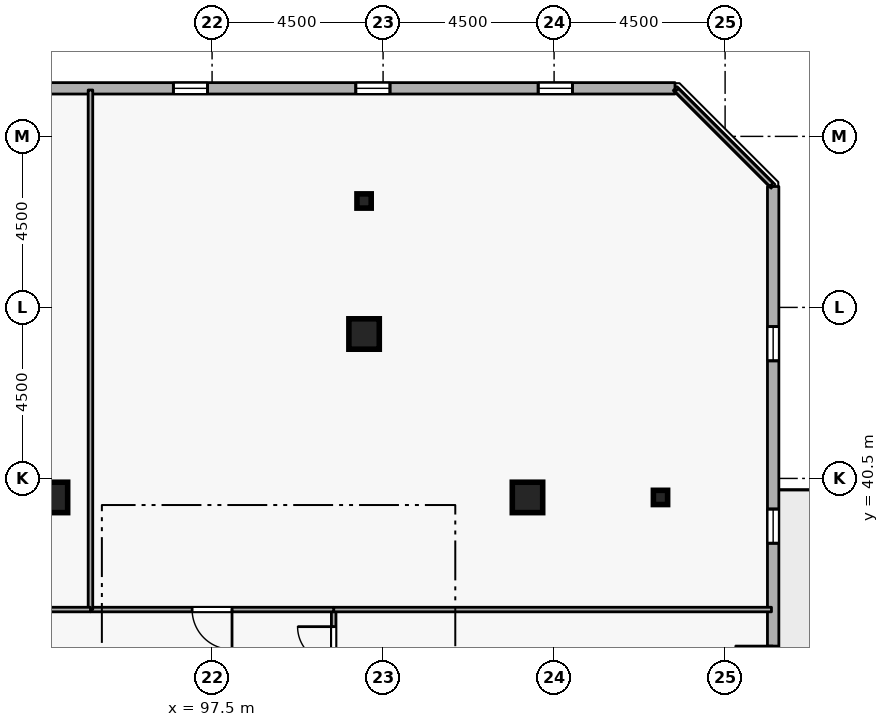
"""IFC4 building model, lengths in metres.
Left out: names, types, materials, properties, quantities, classifications, styles, units other than length and angle.
Written with IfcOpenShell. Run it as: python <this file> out.ifc"""

import sys

from ifc_helpers import new_model, si_unit, direction, frame, frame_2d, origin, origin_2d, place, context, subcontext, project, spatial, rectangle, i_section, extrude, element, fill, save


model = new_model("IFC4")
c1 = context("Model", 3, precision=1e-05, world=origin(), true_north=direction((0.0, 1.0)))
c2 = subcontext(c1, "Body", "Model", "MODEL_VIEW")
j1 = project(units=[si_unit("LENGTHUNIT", "METRE"), si_unit("PLANEANGLEUNIT", "RADIAN")], contexts=[c1])
p1 = place(None, origin())
s1 = spatial("IfcSite", under=j1, at=p1, CompositionType="ELEMENT")
p2 = place(p1, origin())
s2 = spatial("IfcBuilding", under=s1, at=p2, CompositionType="ELEMENT")
p3 = place(p2, frame((0.0, 0.0, 272.7)))
s3 = spatial("IfcBuildingStorey", under=s2, at=p3, CompositionType="ELEMENT", Elevation=272.7)
for number, where, z_axis, x_axis in (
    (1, (105.8, 40.0, 0.0), (0.0, 0.0, 1.0), (1.0, 0.0, 0.0)),
    (2, (101.5, 44.3, 0.0), (0.0, 0.0, 1.0), (1.0, 0.0, 0.0)),
    (3, (93.3, 40.0, 0.0), (0.0, 0.0, 1.0), (1.0, 0.0, 0.0)),
):
    element("IfcColumn", number, at=place(p3, frame(where, z_axis=z_axis, x_axis=x_axis)), inside=s3, PredefinedType="COLUMN", context=c2, shape_type="SweptSolid", body=[
        extrude(rectangle(XDim=0.8, YDim=0.8, at=origin_2d()), origin(), (0.0, 0.0, 1.0), 3.6),
    ])
for number, where, z_axis, x_axis in (
    (4, (109.3, 40.0, 0.0), (0.0, 0.0, 1.0), (1.0, 0.0, 0.0)),
    (5, (101.5, 47.8, 0.0), (0.0, 0.0, 1.0), (1.0, 0.0, 0.0)),
):
    element("IfcColumn", number, at=place(p3, frame(where, z_axis=z_axis, x_axis=x_axis)), inside=s3, PredefinedType="COLUMN", context=c2, shape_type="SweptSolid", body=[
        extrude(i_section(OverallWidth=0.375, OverallDepth=0.375, WebThickness=0.017, FlangeThickness=0.027, FilletRadius=0.015, at=origin_2d()), origin(), (0.0, 0.0, 1.0), 3.6),
    ])
p4 = place(p3, frame((112.264, 12.094, 0.0), z_axis=(0.0, 0.0, 1.0), x_axis=(2.7061402e-05, 0.999999999634, 0.0)))
e6 = element("IfcWall", 6, at=p4, inside=s3, PredefinedType="STANDARD", context=c2, shape_type="SweptSolid", body=[
    extrude(rectangle(XDim=36.087, YDim=0.3, at=frame_2d((18.043, 0.0))), origin(), (0.0, 0.0, 1.0), 2.7),
])
p5 = place(p4, frame((22.993, 0.0, 0.0)))
e7 = element("IfcOpeningElement", 7, at=p5, cuts=e6, PredefinedType="OPENING", context=c2, shape_type="SweptSolid", body=[
    extrude(rectangle(XDim=1.0, YDim=2.08, at=frame_2d((0.5, 1.04))), frame((0.0, 0.16, 0.0), z_axis=(0.0, -1.0, 0.0), x_axis=(1.0, 0.0, 0.0)), (0.0, 0.0, 1.0), 0.32),
])
p6 = place(p4, frame((2.7, 0.0, 0.72)))
e8 = element("IfcOpeningElement", 8, at=p6, cuts=e6, PredefinedType="OPENING", context=c2, shape_type="SweptSolid", body=[
    extrude(rectangle(XDim=0.9, YDim=1.75, at=frame_2d((0.45, 0.875))), frame((0.0, 0.16, 0.0), z_axis=(0.0, -1.0, 0.0), x_axis=(1.0, 0.0, 0.0)), (0.0, 0.0, 1.0), 0.32),
])
p7 = place(p4, frame((7.5, 0.0, 0.72)))
e9 = element("IfcOpeningElement", 9, at=p7, cuts=e6, PredefinedType="OPENING", context=c2, shape_type="SweptSolid", body=[
    extrude(rectangle(XDim=0.9, YDim=1.75, at=frame_2d((0.45, 0.875))), frame((0.0, 0.16, 0.0), z_axis=(0.0, -1.0, 0.0), x_axis=(1.0, 0.0, 0.0)), (0.0, 0.0, 1.0), 0.32),
])
p8 = place(p4, frame((12.3, 0.0, 0.72)))
e10 = element("IfcOpeningElement", 10, at=p8, cuts=e6, PredefinedType="OPENING", context=c2, shape_type="SweptSolid", body=[
    extrude(rectangle(XDim=0.9, YDim=1.75, at=frame_2d((0.45, 0.875))), frame((0.0, 0.16, 0.0), z_axis=(0.0, -1.0, 0.0), x_axis=(1.0, 0.0, 0.0)), (0.0, 0.0, 1.0), 0.32),
])
p9 = place(p4, frame((17.1, 0.0, 0.72)))
e11 = element("IfcOpeningElement", 11, at=p9, cuts=e6, PredefinedType="OPENING", context=c2, shape_type="SweptSolid", body=[
    extrude(rectangle(XDim=0.9, YDim=1.75, at=frame_2d((0.45, 0.875))), frame((0.0, 0.16, 0.0), z_axis=(0.0, -1.0, 0.0), x_axis=(1.0, 0.0, 0.0)), (0.0, 0.0, 1.0), 0.32),
])
p10 = place(p4, frame((26.7, 0.0, 0.72)))
e12 = element("IfcOpeningElement", 12, at=p10, cuts=e6, PredefinedType="OPENING", context=c2, shape_type="SweptSolid", body=[
    extrude(rectangle(XDim=0.9, YDim=1.75, at=frame_2d((0.45, 0.875))), frame((0.0, 0.16, 0.0), z_axis=(0.0, -1.0, 0.0), x_axis=(1.0, 0.0, 0.0)), (0.0, 0.0, 1.0), 0.32),
])
p11 = place(p4, frame((31.5, 0.0, 0.72)))
e13 = element("IfcOpeningElement", 13, at=p11, cuts=e6, PredefinedType="OPENING", context=c2, shape_type="SweptSolid", body=[
    extrude(rectangle(XDim=0.9, YDim=1.75, at=frame_2d((0.45, 0.875))), frame((0.0, 0.16, 0.0), z_axis=(0.0, -1.0, 0.0), x_axis=(1.0, 0.0, 0.0)), (0.0, 0.0, 1.0), 0.32),
])
p12 = place(p3, frame((109.681, 50.765, 0.0), z_axis=(0.0, 0.0, 1.0), x_axis=(-0.999999999634, -2.7061402e-05, 0.0)))
e14 = element("IfcWall", 14, at=p12, inside=s3, PredefinedType="STANDARD", context=c2, shape_type="SweptSolid", body=[
    extrude(rectangle(XDim=36.087, YDim=0.3, at=frame_2d((18.043, 0.0))), origin(), (0.0, 0.0, 1.0), 2.7),
])
p13 = place(p12, frame((2.7, 0.0, 0.72)))
e15 = element("IfcOpeningElement", 15, at=p13, cuts=e14, PredefinedType="OPENING", context=c2, shape_type="SweptSolid", body=[
    extrude(rectangle(XDim=0.9, YDim=1.75, at=frame_2d((0.45, 0.875))), frame((0.0, 0.16, 0.0), z_axis=(0.0, -1.0, 0.0), x_axis=(1.0, 0.0, 0.0)), (0.0, 0.0, 1.0), 0.32),
])
p14 = place(p12, frame((7.5, 0.0, 0.72)))
e16 = element("IfcOpeningElement", 16, at=p14, cuts=e14, PredefinedType="OPENING", context=c2, shape_type="SweptSolid", body=[
    extrude(rectangle(XDim=0.9, YDim=1.75, at=frame_2d((0.45, 0.875))), frame((0.0, 0.16, 0.0), z_axis=(0.0, -1.0, 0.0), x_axis=(1.0, 0.0, 0.0)), (0.0, 0.0, 1.0), 0.32),
])
p15 = place(p12, frame((12.3, 0.0, 0.72)))
e17 = element("IfcOpeningElement", 17, at=p15, cuts=e14, PredefinedType="OPENING", context=c2, shape_type="SweptSolid", body=[
    extrude(rectangle(XDim=0.9, YDim=1.75, at=frame_2d((0.45, 0.875))), frame((0.0, 0.16, 0.0), z_axis=(0.0, -1.0, 0.0), x_axis=(1.0, 0.0, 0.0)), (0.0, 0.0, 1.0), 0.32),
])
p16 = place(p12, frame((17.1, 0.0, 0.72)))
e18 = element("IfcOpeningElement", 18, at=p16, cuts=e14, PredefinedType="OPENING", context=c2, shape_type="SweptSolid", body=[
    extrude(rectangle(XDim=0.9, YDim=1.75, at=frame_2d((0.45, 0.875))), frame((0.0, 0.16, 0.0), z_axis=(0.0, -1.0, 0.0), x_axis=(1.0, 0.0, 0.0)), (0.0, 0.0, 1.0), 0.32),
])
p17 = place(p12, frame((21.9, 0.0, 0.72)))
e19 = element("IfcOpeningElement", 19, at=p17, cuts=e14, PredefinedType="OPENING", context=c2, shape_type="SweptSolid", body=[
    extrude(rectangle(XDim=0.9, YDim=1.75, at=frame_2d((0.45, 0.875))), frame((0.0, 0.16, 0.0), z_axis=(0.0, -1.0, 0.0), x_axis=(1.0, 0.0, 0.0)), (0.0, 0.0, 1.0), 0.32),
])
p18 = place(p12, frame((26.7, 0.0, 0.72)))
e20 = element("IfcOpeningElement", 20, at=p18, cuts=e14, PredefinedType="OPENING", context=c2, shape_type="SweptSolid", body=[
    extrude(rectangle(XDim=0.9, YDim=1.75, at=frame_2d((0.45, 0.875))), frame((0.0, 0.16, 0.0), z_axis=(0.0, -1.0, 0.0), x_axis=(1.0, 0.0, 0.0)), (0.0, 0.0, 1.0), 0.32),
])
p19 = place(p12, frame((31.5, 0.0, 0.72)))
e21 = element("IfcOpeningElement", 21, at=p19, cuts=e14, PredefinedType="OPENING", context=c2, shape_type="SweptSolid", body=[
    extrude(rectangle(XDim=0.9, YDim=1.75, at=frame_2d((0.45, 0.875))), frame((0.0, 0.16, 0.0), z_axis=(0.0, -1.0, 0.0), x_axis=(1.0, 0.0, 0.0)), (0.0, 0.0, 1.0), 0.32),
])
p20 = place(p3, frame((100.7, 35.2, 0.0), z_axis=(0.0, 0.0, 1.0), x_axis=(0.0, 1.0, 0.0)))
e22 = element("IfcWall", 22, at=p20, inside=s3, PredefinedType="PARTITIONING", context=c2, shape_type="SweptSolid", body=[
    extrude(rectangle(XDim=1.85, YDim=0.12, at=frame_2d((0.925, 0.0))), origin(), (0.0, 0.0, 1.0), 3.34),
])
p21 = place(p20, frame((0.45, 0.0, 0.0)))
e23 = element("IfcOpeningElement", 23, at=p21, cuts=e22, PredefinedType="OPENING", context=c2, shape_type="SweptSolid", body=[
    extrude(rectangle(XDim=0.95, YDim=2.1, at=frame_2d((0.475, 1.05))), frame((0.0, 0.07, 0.0), z_axis=(0.0, -1.0, 0.0), x_axis=(1.0, 0.0, 0.0)), (0.0, 0.0, 1.0), 0.14),
])
p22 = place(p3, frame((100.7, 37.05, 0.0), z_axis=(0.0, 0.0, 1.0), x_axis=(1.0, 0.0, 0.0)))
e24 = element("IfcWall", 24, at=p22, inside=s3, PredefinedType="PARTITIONING", context=c2, shape_type="SweptSolid", body=[
    extrude(rectangle(XDim=11.52, YDim=0.12, at=frame_2d((5.76, 0.0))), origin(), (0.0, 0.0, 1.0), 3.34),
])
p23 = place(p3, frame((100.7, 37.05, 0.0), z_axis=(0.0, 0.0, 1.0), x_axis=(-1.0, 0.0, 0.0)))
e25 = element("IfcWall", 25, at=p23, inside=s3, PredefinedType="PARTITIONING", context=c2, shape_type="SweptSolid", body=[
    extrude(rectangle(XDim=6.4, YDim=0.12, at=frame_2d((3.2, 0.0))), origin(), (0.0, 0.0, 1.0), 3.34),
])
p24 = place(p23, frame((2.675, 0.0, 0.0)))
e26 = element("IfcOpeningElement", 26, at=p24, cuts=e25, PredefinedType="OPENING", context=c2, shape_type="SweptSolid", body=[
    extrude(rectangle(XDim=1.05, YDim=2.1, at=frame_2d((0.525, 1.05))), frame((0.0, 0.07, 0.0), z_axis=(0.0, -1.0, 0.0), x_axis=(1.0, 0.0, 0.0)), (0.0, 0.0, 1.0), 0.14),
])
p25 = place(p3, frame((94.3, 37.05, 0.0), z_axis=(0.0, 0.0, 1.0), x_axis=(0.0, 1.0, 0.0)))
e27 = element("IfcWall", 27, at=p25, inside=s3, PredefinedType="PARTITIONING", context=c2, shape_type="SweptSolid", body=[
    extrude(rectangle(XDim=13.67, YDim=0.12, at=frame_2d((6.835, 0.0))), origin(), (0.0, 0.0, 1.0), 3.34),
])
p26 = place(p3, frame((109.725, 50.72, 0.0), z_axis=(0.0, 0.0, 1.0), x_axis=(0.707106781187, -0.707106781187, 0.0)))
e28 = element("IfcWall", 28, at=p26, inside=s3, PredefinedType="PARTITIONING", context=c2, shape_type="SweptSolid", body=[
    extrude(rectangle(XDim=3.528, YDim=0.12, at=frame_2d((1.764, 0.0))), origin(), (0.0, 0.0, 1.0), 3.34),
])
p27 = place(p3, frame((94.3, 37.05, 0.0), z_axis=(0.0, 0.0, 1.0), x_axis=(-1.0, 0.0, 0.0)))
e29 = element("IfcWall", 29, at=p27, inside=s3, PredefinedType="PARTITIONING", context=c2, shape_type="SweptSolid", body=[
    extrude(rectangle(XDim=5.4, YDim=0.12, at=frame_2d((2.7, 0.0))), origin(), (0.0, 0.0, 1.0), 3.34),
])
p28 = place(p27, frame((2.225, 0.0, 0.0)))
e30 = element("IfcOpeningElement", 30, at=p28, cuts=e29, PredefinedType="OPENING", context=c2, shape_type="SweptSolid", body=[
    extrude(rectangle(XDim=0.95, YDim=2.1, at=frame_2d((0.475, 1.05))), frame((0.0, 0.07, 0.0), z_axis=(0.0, -1.0, 0.0), x_axis=(1.0, 0.0, 0.0)), (0.0, 0.0, 1.0), 0.14),
])
p29 = place(p5, origin())
e31 = element("IfcDoor", 31, at=p29, inside=s3, OperationType="SINGLE_SWING_RIGHT", PredefinedType="DOOR", context=c2, shape_type="SweptSolid", body=[
    extrude(rectangle(XDim=1.0, YDim=2.08, at=frame_2d((0.5, 1.04))), frame((0.0, 0.025, 0.0), z_axis=(0.0, -1.0, 0.0), x_axis=(1.0, 0.0, 0.0)), (0.0, 0.0, 1.0), 0.05),
])
fill(e7, e31)
p30 = place(p10, origin())
e32 = element("IfcWindow", 32, at=p30, inside=s3, PartitioningType="SINGLE_PANEL", PredefinedType="WINDOW", context=c2, shape_type="SweptSolid", body=[
    extrude(rectangle(XDim=0.9, YDim=1.75, at=frame_2d((0.45, 0.875))), frame((0.0, 0.03, 0.0), z_axis=(0.0, -1.0, 0.0), x_axis=(1.0, 0.0, 0.0)), (0.0, 0.0, 1.0), 0.06),
])
fill(e12, e32)
p31 = place(p11, origin())
e33 = element("IfcWindow", 33, at=p31, inside=s3, PartitioningType="SINGLE_PANEL", PredefinedType="WINDOW", context=c2, shape_type="SweptSolid", body=[
    extrude(rectangle(XDim=0.9, YDim=1.75, at=frame_2d((0.45, 0.875))), frame((0.0, 0.03, 0.0), z_axis=(0.0, -1.0, 0.0), x_axis=(1.0, 0.0, 0.0)), (0.0, 0.0, 1.0), 0.06),
])
fill(e13, e33)
p32 = place(p13, origin())
e34 = element("IfcWindow", 34, at=p32, inside=s3, PartitioningType="SINGLE_PANEL", PredefinedType="WINDOW", context=c2, shape_type="SweptSolid", body=[
    extrude(rectangle(XDim=0.9, YDim=1.75, at=frame_2d((0.45, 0.875))), frame((0.0, 0.03, 0.0), z_axis=(0.0, -1.0, 0.0), x_axis=(1.0, 0.0, 0.0)), (0.0, 0.0, 1.0), 0.06),
])
fill(e15, e34)
p33 = place(p14, origin())
e35 = element("IfcWindow", 35, at=p33, inside=s3, PartitioningType="SINGLE_PANEL", PredefinedType="WINDOW", context=c2, shape_type="SweptSolid", body=[
    extrude(rectangle(XDim=0.9, YDim=1.75, at=frame_2d((0.45, 0.875))), frame((0.0, 0.03, 0.0), z_axis=(0.0, -1.0, 0.0), x_axis=(1.0, 0.0, 0.0)), (0.0, 0.0, 1.0), 0.06),
])
fill(e16, e35)
p34 = place(p15, origin())
e36 = element("IfcWindow", 36, at=p34, inside=s3, PartitioningType="SINGLE_PANEL", PredefinedType="WINDOW", context=c2, shape_type="SweptSolid", body=[
    extrude(rectangle(XDim=0.9, YDim=1.75, at=frame_2d((0.45, 0.875))), frame((0.0, 0.03, 0.0), z_axis=(0.0, -1.0, 0.0), x_axis=(1.0, 0.0, 0.0)), (0.0, 0.0, 1.0), 0.06),
])
fill(e17, e36)
p35 = place(p21, origin())
e37 = element("IfcDoor", 37, at=p35, inside=s3, OperationType="SINGLE_SWING_RIGHT", PredefinedType="DOOR", context=c2, shape_type="SweptSolid", body=[
    extrude(rectangle(XDim=0.95, YDim=2.1, at=frame_2d((0.475, 1.05))), frame((0.0, 0.025, 0.0), z_axis=(0.0, -1.0, 0.0), x_axis=(1.0, 0.0, 0.0)), (0.0, 0.0, 1.0), 0.05),
])
fill(e23, e37)
p36 = place(p24, origin())
e38 = element("IfcDoor", 38, at=p36, inside=s3, OperationType="SINGLE_SWING_LEFT", PredefinedType="DOOR", context=c2, shape_type="SweptSolid", body=[
    extrude(rectangle(XDim=1.05, YDim=2.1, at=frame_2d((0.525, 1.05))), frame((0.0, 0.025, 0.0), z_axis=(0.0, -1.0, 0.0), x_axis=(1.0, 0.0, 0.0)), (0.0, 0.0, 1.0), 0.05),
])
fill(e26, e38)
save(model, sys.argv[1])
